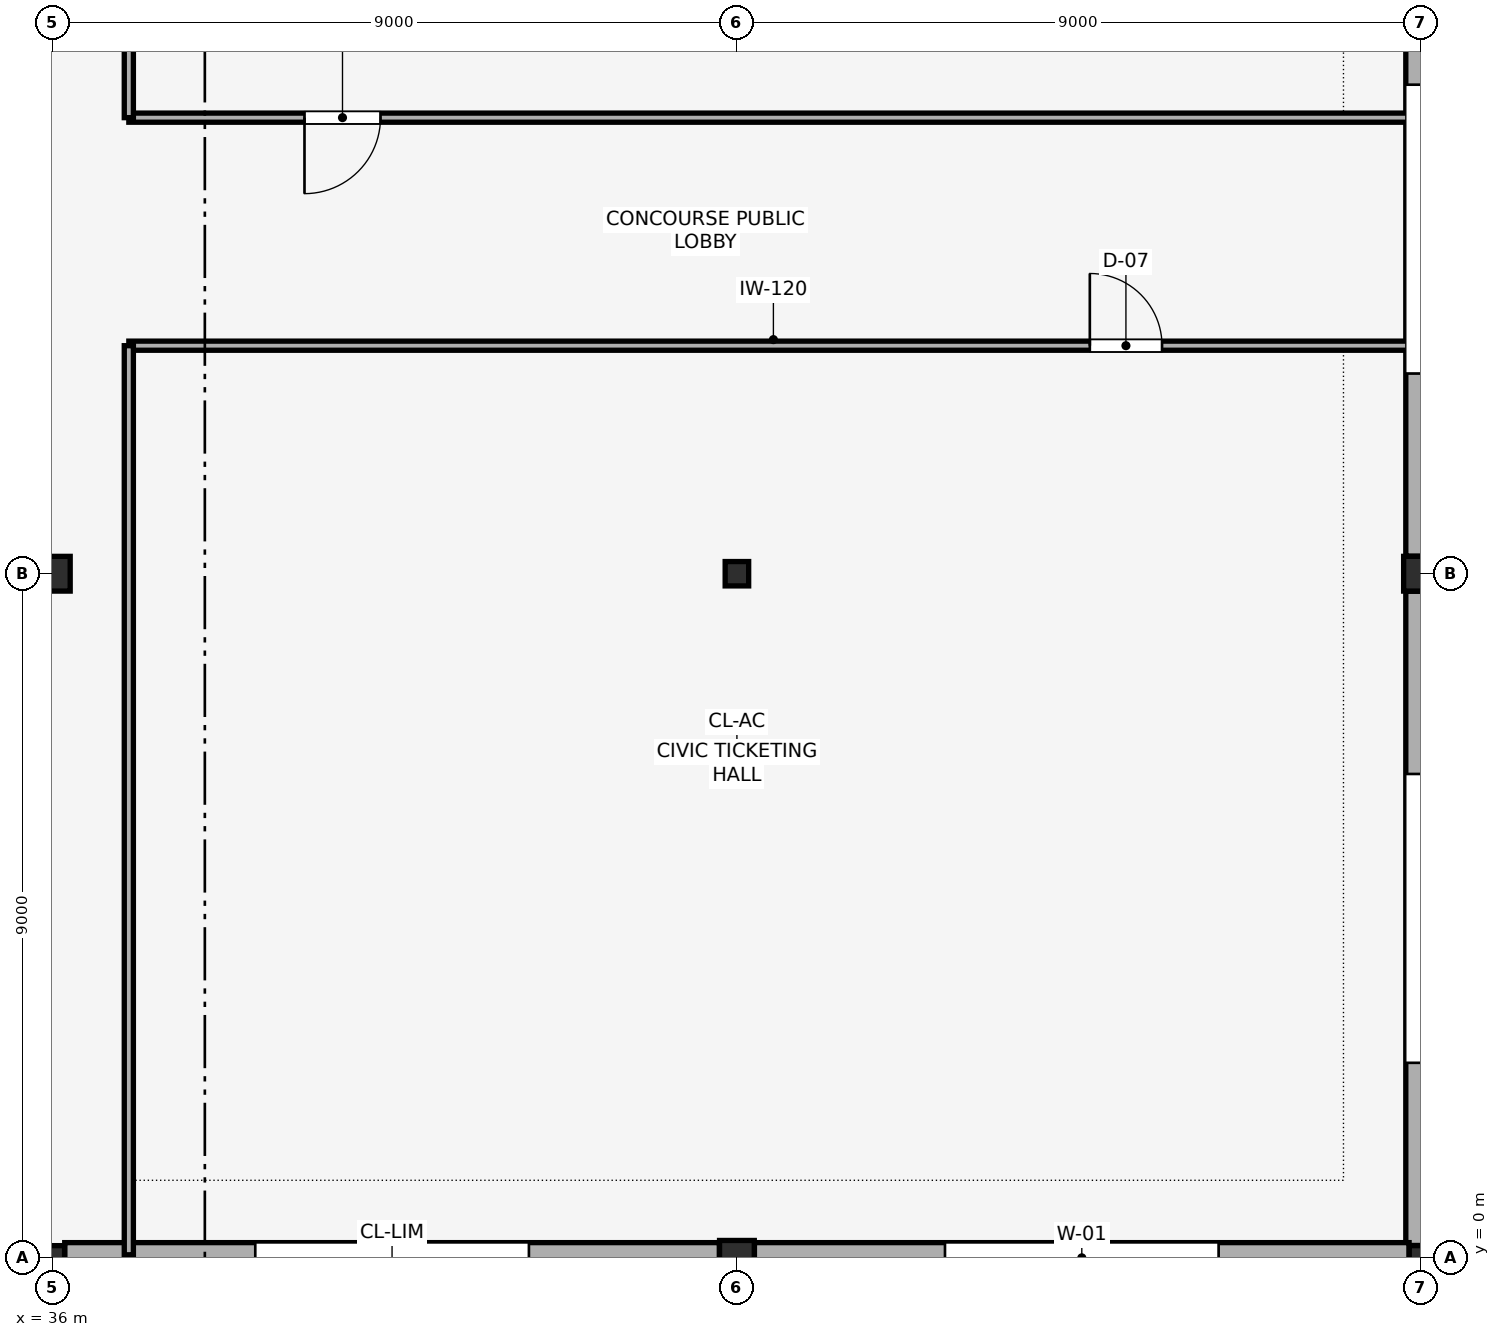
"""IFC4 building model, lengths in metres.
Left out: names, types, materials, properties, quantities, classifications, styles, units other than length and angle.
Written with IfcOpenShell. Run it as: python <this file> out.ifc"""

import sys

from ifc_helpers import new_model, si_unit, direction, frame, frame_2d, origin, origin_2d, place, context, subcontext, project, spatial, rectangle, hollow_circle, i_section, extrude, element, fill, save


model = new_model("IFC4")
c1 = context("Model", 3, precision=1e-05, world=origin(), true_north=direction((0.0, 1.0)))
c2 = subcontext(c1, "Body", "Model", "MODEL_VIEW")
j1 = project(units=[si_unit("LENGTHUNIT", "METRE"), si_unit("PLANEANGLEUNIT", "RADIAN")], contexts=[c1])
p1 = place(None, origin())
s1 = spatial("IfcSite", under=j1, at=p1, CompositionType="ELEMENT")
p2 = place(p1, origin())
s2 = spatial("IfcBuilding", under=s1, at=p2, CompositionType="ELEMENT")
p3 = place(p2, origin())
s3 = spatial("IfcBuildingStorey", under=s2, at=p3, CompositionType="ELEMENT", Elevation=0.0)
p4 = place(p3, frame((36.0, 0.0, 0.0), z_axis=(0.0, 0.0, 1.0), x_axis=(1.0, 0.0, 0.0)))
e1 = element("IfcColumn", 1, at=p4, inside=s3, PredefinedType="COLUMN", context=c2, shape_type="SweptSolid", body=[
    extrude(i_section(OverallWidth=0.309, OverallDepth=0.321, WebThickness=0.014, FlangeThickness=0.022, FilletRadius=0.015, at=origin_2d()), origin(), (0.0, 0.0, 1.0), 5.4),
])
for number, where, z_axis, x_axis in (
    (2, (36.0, 9.0, 0.0), (0.0, 0.0, 1.0), (1.0, 0.0, 0.0)),
    (3, (45.0, 0.0, 0.0), (0.0, 0.0, 1.0), (1.0, 0.0, 0.0)),
):
    element("IfcColumn", number, at=place(p3, frame(where, z_axis=z_axis, x_axis=x_axis)), inside=s3, PredefinedType="COLUMN", context=c2, shape_type="SweptSolid", body=[
        extrude(hollow_circle(Radius=0.229, WallThickness=0.02, at=origin_2d()), origin(), (0.0, 0.0, 1.0), 5.4),
    ])
for number, where, z_axis, x_axis in (
    (4, (45.0, 9.0, 0.0), (0.0, 0.0, 1.0), (1.0, 0.0, 0.0)),
    (5, (54.0, 0.0, 0.0), (0.0, 0.0, 1.0), (1.0, 0.0, 0.0)),
):
    element("IfcColumn", number, at=place(p3, frame(where, z_axis=z_axis, x_axis=x_axis)), inside=s3, PredefinedType="COLUMN", context=c2, shape_type="SweptSolid", body=[
        extrude(i_section(OverallWidth=0.309, OverallDepth=0.321, WebThickness=0.014, FlangeThickness=0.022, FilletRadius=0.015, at=origin_2d()), origin(), (0.0, 0.0, 1.0), 5.4),
    ])
p5 = place(p3, frame((54.0, 9.0, 0.0), z_axis=(0.0, 0.0, 1.0), x_axis=(1.0, 0.0, 0.0)))
e6 = element("IfcColumn", 6, at=p5, inside=s3, PredefinedType="COLUMN", context=c2, shape_type="SweptSolid", body=[
    extrude(hollow_circle(Radius=0.229, WallThickness=0.02, at=origin_2d()), origin(), (0.0, 0.0, 1.0), 5.4),
])
p6 = place(p3, frame((54.0, 17.838, 0.0), z_axis=(0.0, 0.0, 1.0), x_axis=(0.0, -1.0, 0.0)))
e7 = element("IfcWall", 7, at=p6, inside=s3, PredefinedType="STANDARD", context=c2, shape_type="SweptSolid", body=[
    extrude(rectangle(XDim=8.607, YDim=0.4, at=frame_2d((4.304, 0.0))), origin(), (0.0, 0.0, 1.0), 4.815),
])
p7 = place(p6, frame((2.404, 0.0, 0.0)))
e8 = element("IfcOpeningElement", 8, at=p7, cuts=e7, PredefinedType="OPENING", context=c2, shape_type="SweptSolid", body=[
    extrude(rectangle(XDim=3.8, YDim=2.8, at=frame_2d((1.9, 1.4))), frame((0.0, 0.21, 0.0), z_axis=(0.0, -1.0, 0.0), x_axis=(1.0, 0.0, 0.0)), (0.0, 0.0, 1.0), 0.42),
])
p8 = place(p3, frame((54.0, 8.77, 0.0), z_axis=(0.0, 0.0, 1.0), x_axis=(0.0, -1.0, 0.0)))
e9 = element("IfcWall", 9, at=p8, inside=s3, PredefinedType="STANDARD", context=c2, shape_type="SweptSolid", body=[
    extrude(rectangle(XDim=8.607, YDim=0.4, at=frame_2d((4.304, 0.0))), origin(), (0.0, 0.0, 1.0), 4.815),
])
p9 = place(p8, frame((2.404, 0.0, 0.0)))
e10 = element("IfcOpeningElement", 10, at=p9, cuts=e9, PredefinedType="OPENING", context=c2, shape_type="SweptSolid", body=[
    extrude(rectangle(XDim=3.8, YDim=2.8, at=frame_2d((1.9, 1.4))), frame((0.0, 0.21, 0.0), z_axis=(0.0, -1.0, 0.0), x_axis=(1.0, 0.0, 0.0)), (0.0, 0.0, 1.0), 0.42),
])
p10 = place(p3, frame((53.844, 0.0, 0.0), z_axis=(0.0, 0.0, 1.0), x_axis=(-1.0, 0.0, 0.0)))
e11 = element("IfcWall", 11, at=p10, inside=s3, PredefinedType="STANDARD", context=c2, shape_type="SweptSolid", body=[
    extrude(rectangle(XDim=8.613, YDim=0.4, at=frame_2d((4.307, 0.0))), origin(), (0.0, 0.0, 1.0), 4.507),
])
p11 = place(p10, frame((2.506, 0.0, 0.85)))
e12 = element("IfcOpeningElement", 12, at=p11, cuts=e11, PredefinedType="OPENING", context=c2, shape_type="SweptSolid", body=[
    extrude(rectangle(XDim=3.6, YDim=2.4, at=frame_2d((1.8, 1.2))), frame((0.0, 0.21, 0.0), z_axis=(0.0, -1.0, 0.0), x_axis=(1.0, 0.0, 0.0)), (0.0, 0.0, 1.0), 0.42),
])
p12 = place(p3, frame((44.77, 0.0, 0.0), z_axis=(0.0, 0.0, 1.0), x_axis=(-1.0, 0.0, 0.0)))
e13 = element("IfcWall", 13, at=p12, inside=s3, PredefinedType="STANDARD", context=c2, shape_type="SweptSolid", body=[
    extrude(rectangle(XDim=8.613, YDim=0.4, at=frame_2d((4.307, 0.0))), origin(), (0.0, 0.0, 1.0), 4.507),
])
p13 = place(p12, frame((2.506, 0.0, 0.85)))
e14 = element("IfcOpeningElement", 14, at=p13, cuts=e13, PredefinedType="OPENING", context=c2, shape_type="SweptSolid", body=[
    extrude(rectangle(XDim=3.6, YDim=2.4, at=frame_2d((1.8, 1.2))), frame((0.0, 0.21, 0.0), z_axis=(0.0, -1.0, 0.0), x_axis=(1.0, 0.0, 0.0)), (0.0, 0.0, 1.0), 0.42),
])
p14 = place(p3, frame((37.0, 12.0, 0.0), z_axis=(0.0, 0.0, 1.0), x_axis=(1.0, 0.0, 0.0)))
e15 = element("IfcWall", 15, at=p14, inside=s3, PredefinedType="PARTITIONING", context=c2, shape_type="SweptSolid", body=[
    extrude(rectangle(XDim=16.96, YDim=0.12, at=frame_2d((8.48, 0.0))), origin(), (0.0, 0.0, 1.0), 4.658),
])
p15 = place(p14, frame((12.643, 0.0, 0.0)))
e16 = element("IfcOpeningElement", 16, at=p15, cuts=e15, PredefinedType="OPENING", context=c2, shape_type="SweptSolid", body=[
    extrude(rectangle(XDim=0.95, YDim=2.1, at=frame_2d((0.475, 1.05))), frame((0.0, 0.07, 0.0), z_axis=(0.0, -1.0, 0.0), x_axis=(1.0, 0.0, 0.0)), (0.0, 0.0, 1.0), 0.14),
])
p16 = place(p3, frame((37.0, 0.04, 0.0), z_axis=(0.0, 0.0, 1.0), x_axis=(0.0, 1.0, 0.0)))
e17 = element("IfcWall", 17, at=p16, inside=s3, PredefinedType="PARTITIONING", context=c2, shape_type="SweptSolid", body=[
    extrude(rectangle(XDim=11.96, YDim=0.12, at=frame_2d((5.98, 0.0))), origin(), (0.0, 0.0, 1.0), 5.12),
])
p17 = place(p3, frame((53.96, 15.0, 0.0), z_axis=(0.0, 0.0, 1.0), x_axis=(-1.0, 0.0, 0.0)))
e18 = element("IfcWall", 18, at=p17, inside=s3, PredefinedType="PARTITIONING", context=c2, shape_type="SweptSolid", body=[
    extrude(rectangle(XDim=16.96, YDim=0.12, at=frame_2d((8.48, 0.0))), origin(), (0.0, 0.0, 1.0), 4.658),
])
p18 = place(p17, frame((13.649, 0.0, 0.0)))
e19 = element("IfcOpeningElement", 19, at=p18, cuts=e18, PredefinedType="OPENING", context=c2, shape_type="SweptSolid", body=[
    extrude(rectangle(XDim=1.0, YDim=2.15, at=frame_2d((0.5, 1.075))), frame((0.0, 0.07, 0.0), z_axis=(0.0, -1.0, 0.0), x_axis=(1.0, 0.0, 0.0)), (0.0, 0.0, 1.0), 0.14),
])
p19 = place(p3, frame((37.0, 15.0, 0.0), z_axis=(0.0, 0.0, 1.0), x_axis=(0.0, 1.0, 0.0)))
e20 = element("IfcWall", 20, at=p19, inside=s3, PredefinedType="PARTITIONING", context=c2, shape_type="SweptSolid", body=[
    extrude(rectangle(XDim=10.5, YDim=0.12, at=frame_2d((5.25, 0.0))), origin(), (0.0, 0.0, 1.0), 5.12),
])
p20 = place(p7, origin())
e21 = element("IfcDoor", 21, at=p20, inside=s3, OperationType="DOUBLE_DOOR_SINGLE_SWING", PredefinedType="DOOR", context=c2, shape_type="SweptSolid", body=[
    extrude(rectangle(XDim=3.8, YDim=2.8, at=frame_2d((1.9, 1.4))), frame((0.0, 0.025, 0.0), z_axis=(0.0, -1.0, 0.0), x_axis=(1.0, 0.0, 0.0)), (0.0, 0.0, 1.0), 0.05),
])
fill(e8, e21)
p21 = place(p9, origin())
e22 = element("IfcDoor", 22, at=p21, inside=s3, OperationType="DOUBLE_DOOR_SINGLE_SWING", PredefinedType="DOOR", context=c2, shape_type="SweptSolid", body=[
    extrude(rectangle(XDim=3.8, YDim=2.8, at=frame_2d((1.9, 1.4))), frame((0.0, 0.025, 0.0), z_axis=(0.0, -1.0, 0.0), x_axis=(1.0, 0.0, 0.0)), (0.0, 0.0, 1.0), 0.05),
])
fill(e10, e22)
p22 = place(p11, origin())
e23 = element("IfcWindow", 23, at=p22, inside=s3, PartitioningType="SINGLE_PANEL", PredefinedType="WINDOW", context=c2, shape_type="SweptSolid", body=[
    extrude(rectangle(XDim=3.6, YDim=2.4, at=frame_2d((1.8, 1.2))), frame((0.0, 0.03, 0.0), z_axis=(0.0, -1.0, 0.0), x_axis=(1.0, 0.0, 0.0)), (0.0, 0.0, 1.0), 0.06),
])
fill(e12, e23)
p23 = place(p13, origin())
e24 = element("IfcWindow", 24, at=p23, inside=s3, PartitioningType="SINGLE_PANEL", PredefinedType="WINDOW", context=c2, shape_type="SweptSolid", body=[
    extrude(rectangle(XDim=3.6, YDim=2.4, at=frame_2d((1.8, 1.2))), frame((0.0, 0.03, 0.0), z_axis=(0.0, -1.0, 0.0), x_axis=(1.0, 0.0, 0.0)), (0.0, 0.0, 1.0), 0.06),
])
fill(e14, e24)
p24 = place(p15, origin())
e25 = element("IfcDoor", 25, at=p24, inside=s3, OperationType="SINGLE_SWING_LEFT", PredefinedType="DOOR", context=c2, shape_type="SweptSolid", body=[
    extrude(rectangle(XDim=0.95, YDim=2.1, at=frame_2d((0.475, 1.05))), frame((0.0, 0.025, 0.0), z_axis=(0.0, -1.0, 0.0), x_axis=(1.0, 0.0, 0.0)), (0.0, 0.0, 1.0), 0.05),
])
fill(e16, e25)
p25 = place(p18, origin())
e26 = element("IfcDoor", 26, at=p25, inside=s3, OperationType="SINGLE_SWING_RIGHT", PredefinedType="DOOR", context=c2, shape_type="SweptSolid", body=[
    extrude(rectangle(XDim=1.0, YDim=2.15, at=frame_2d((0.5, 1.075))), frame((0.0, 0.025, 0.0), z_axis=(0.0, -1.0, 0.0), x_axis=(1.0, 0.0, 0.0)), (0.0, 0.0, 1.0), 0.05),
])
fill(e19, e26)
save(model, sys.argv[1])
